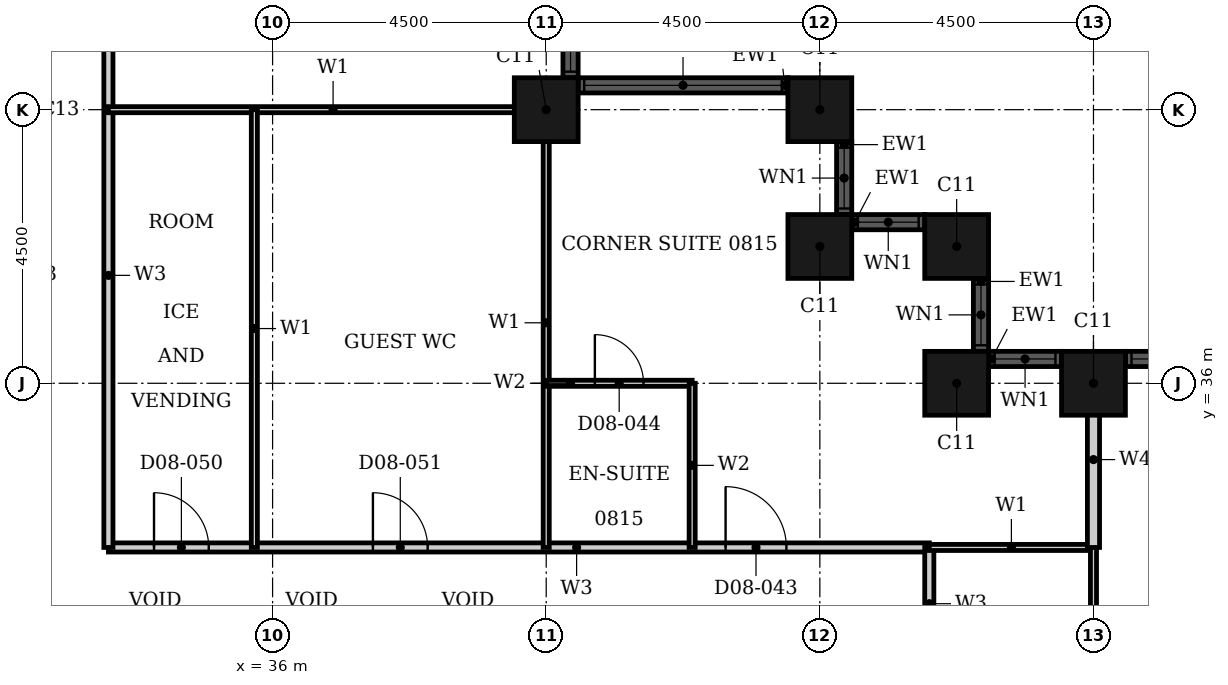
"""IFC4 building model, lengths in metres.
Left out: names, types, materials, properties, quantities, classifications, styles, units other than length and angle.
Written with IfcOpenShell. Run it as: python <this file> out.ifc"""

import sys

from ifc_helpers import new_model, si_unit, direction, frame, frame_2d, origin, origin_2d, place, context, subcontext, project, spatial, rectangle, hollow_rectangle, extrude, element, fill, save


model = new_model("IFC4")
c1 = context("Model", 3, precision=1e-05, world=origin(), true_north=direction((0.0, 1.0)))
c2 = subcontext(c1, "Body", "Model", "MODEL_VIEW")
j1 = project(units=[si_unit("LENGTHUNIT", "METRE"), si_unit("PLANEANGLEUNIT", "RADIAN")], contexts=[c1])
p1 = place(None, origin())
s1 = spatial("IfcSite", under=j1, at=p1, CompositionType="ELEMENT")
p2 = place(p1, origin())
s2 = spatial("IfcBuilding", under=s1, at=p2, CompositionType="ELEMENT")
p3 = place(p2, frame((0.0, 0.0, 40.8)))
s3 = spatial("IfcBuildingStorey", under=s2, at=p3, CompositionType="ELEMENT", Elevation=40.8)
for number, where, z_axis, x_axis in (
    (1, (49.5, 36.0, 0.0), (0.0, 0.0, 1.0), (1.0, 0.0, 0.0)),
    (2, (47.25, 36.0, 0.0), (0.0, 0.0, 1.0), (1.0, 0.0, 0.0)),
    (3, (47.25, 38.25, 0.0), (0.0, 0.0, 1.0), (1.0, 0.0, 0.0)),
    (4, (45.0, 38.25, 0.0), (0.0, 0.0, 1.0), (1.0, 0.0, 0.0)),
    (5, (45.0, 40.5, 0.0), (0.0, 0.0, 1.0), (1.0, 0.0, 0.0)),
    (6, (40.5, 40.5, 0.0), (0.0, 0.0, 1.0), (1.0, 0.0, 0.0)),
):
    element("IfcColumn", number, at=place(p3, frame(where, z_axis=z_axis, x_axis=x_axis)), inside=s3, PredefinedType="COLUMN", context=c2, shape_type="SweptSolid", body=[
        extrude(hollow_rectangle(XDim=1.05, YDim=1.05, WallThickness=0.034, at=origin_2d()), origin(), (0.0, 0.0, 1.0), 3.6),
    ])
p4 = place(p3, frame((57.975, 36.4, 0.0), z_axis=(0.0, 0.0, 1.0), x_axis=(-1.0, 0.0, 0.0)))
e7 = element("IfcWall", 7, at=p4, inside=s3, PredefinedType="SOLIDWALL", context=c2, shape_type="SweptSolid", body=[
    extrude(rectangle(XDim=7.95, YDim=0.25, at=frame_2d((3.975, 0.0))), origin(), (0.0, 0.0, 1.0), 3.6),
])
p5 = place(p4, frame((0.1, 0.0, 0.9)))
e8 = element("IfcOpeningElement", 8, at=p5, cuts=e7, PredefinedType="OPENING", context=c2, shape_type="SweptSolid", body=[
    extrude(rectangle(XDim=3.25, YDim=2.08, at=frame_2d((1.625, 1.04))), frame((0.0, 0.135, 0.0), z_axis=(0.0, -1.0, 0.0), x_axis=(1.0, 0.0, 0.0)), (0.0, 0.0, 1.0), 0.27),
])
p6 = place(p4, frame((4.6, 0.0, 0.9)))
e9 = element("IfcOpeningElement", 9, at=p6, cuts=e7, PredefinedType="OPENING", context=c2, shape_type="SweptSolid", body=[
    extrude(rectangle(XDim=3.25, YDim=2.08, at=frame_2d((1.625, 1.04))), frame((0.0, 0.135, 0.0), z_axis=(0.0, -1.0, 0.0), x_axis=(1.0, 0.0, 0.0)), (0.0, 0.0, 1.0), 0.27),
])
p7 = place(p3, frame((48.975, 36.4, 0.0), z_axis=(0.0, 0.0, 1.0), x_axis=(-1.0, 0.0, 0.0)))
e10 = element("IfcWall", 10, at=p7, inside=s3, PredefinedType="SOLIDWALL", context=c2, shape_type="SweptSolid", body=[
    extrude(rectangle(XDim=1.2, YDim=0.25, at=frame_2d((0.6, 0.0))), origin(), (0.0, 0.0, 1.0), 3.6),
])
p8 = place(p7, frame((0.1, 0.0, 0.9)))
e11 = element("IfcOpeningElement", 11, at=p8, cuts=e10, PredefinedType="OPENING", context=c2, shape_type="SweptSolid", body=[
    extrude(rectangle(XDim=1.0, YDim=2.08, at=frame_2d((0.5, 1.04))), frame((0.0, 0.135, 0.0), z_axis=(0.0, -1.0, 0.0), x_axis=(1.0, 0.0, 0.0)), (0.0, 0.0, 1.0), 0.27),
])
p9 = place(p3, frame((47.65, 36.525, 0.0), z_axis=(0.0, 0.0, 1.0), x_axis=(0.0, 1.0, 0.0)))
e12 = element("IfcWall", 12, at=p9, inside=s3, PredefinedType="SOLIDWALL", context=c2, shape_type="SweptSolid", body=[
    extrude(rectangle(XDim=1.2, YDim=0.25, at=frame_2d((0.6, 0.0))), origin(), (0.0, 0.0, 1.0), 3.6),
])
p10 = place(p9, frame((0.1, 0.0, 0.9)))
e13 = element("IfcOpeningElement", 13, at=p10, cuts=e12, PredefinedType="OPENING", context=c2, shape_type="SweptSolid", body=[
    extrude(rectangle(XDim=1.0, YDim=2.08, at=frame_2d((0.5, 1.04))), frame((0.0, 0.135, 0.0), z_axis=(0.0, -1.0, 0.0), x_axis=(1.0, 0.0, 0.0)), (0.0, 0.0, 1.0), 0.27),
])
p11 = place(p3, frame((46.725, 38.65, 0.0), z_axis=(0.0, 0.0, 1.0), x_axis=(-1.0, 0.0, 0.0)))
e14 = element("IfcWall", 14, at=p11, inside=s3, PredefinedType="SOLIDWALL", context=c2, shape_type="SweptSolid", body=[
    extrude(rectangle(XDim=1.2, YDim=0.25, at=frame_2d((0.6, 0.0))), origin(), (0.0, 0.0, 1.0), 3.6),
])
p12 = place(p11, frame((0.1, 0.0, 0.9)))
e15 = element("IfcOpeningElement", 15, at=p12, cuts=e14, PredefinedType="OPENING", context=c2, shape_type="SweptSolid", body=[
    extrude(rectangle(XDim=1.0, YDim=2.08, at=frame_2d((0.5, 1.04))), frame((0.0, 0.135, 0.0), z_axis=(0.0, -1.0, 0.0), x_axis=(1.0, 0.0, 0.0)), (0.0, 0.0, 1.0), 0.27),
])
p13 = place(p3, frame((45.4, 38.775, 0.0), z_axis=(0.0, 0.0, 1.0), x_axis=(0.0, 1.0, 0.0)))
e16 = element("IfcWall", 16, at=p13, inside=s3, PredefinedType="SOLIDWALL", context=c2, shape_type="SweptSolid", body=[
    extrude(rectangle(XDim=1.2, YDim=0.25, at=frame_2d((0.6, 0.0))), origin(), (0.0, 0.0, 1.0), 3.6),
])
p14 = place(p13, frame((0.1, 0.0, 0.9)))
e17 = element("IfcOpeningElement", 17, at=p14, cuts=e16, PredefinedType="OPENING", context=c2, shape_type="SweptSolid", body=[
    extrude(rectangle(XDim=1.0, YDim=2.08, at=frame_2d((0.5, 1.04))), frame((0.0, 0.135, 0.0), z_axis=(0.0, -1.0, 0.0), x_axis=(1.0, 0.0, 0.0)), (0.0, 0.0, 1.0), 0.27),
])
p15 = place(p3, frame((44.475, 40.9, 0.0), z_axis=(0.0, 0.0, 1.0), x_axis=(-1.0, 0.0, 0.0)))
e18 = element("IfcWall", 18, at=p15, inside=s3, PredefinedType="SOLIDWALL", context=c2, shape_type="SweptSolid", body=[
    extrude(rectangle(XDim=3.45, YDim=0.25, at=frame_2d((1.725, 0.0))), origin(), (0.0, 0.0, 1.0), 3.6),
])
p16 = place(p15, frame((0.1, 0.0, 0.9)))
e19 = element("IfcOpeningElement", 19, at=p16, cuts=e18, PredefinedType="OPENING", context=c2, shape_type="SweptSolid", body=[
    extrude(rectangle(XDim=3.25, YDim=2.08, at=frame_2d((1.625, 1.04))), frame((0.0, 0.135, 0.0), z_axis=(0.0, -1.0, 0.0), x_axis=(1.0, 0.0, 0.0)), (0.0, 0.0, 1.0), 0.27),
])
p17 = place(p3, frame((40.9, 41.025, 0.0), z_axis=(0.0, 0.0, 1.0), x_axis=(0.0, 1.0, 0.0)))
e20 = element("IfcWall", 20, at=p17, inside=s3, PredefinedType="SOLIDWALL", context=c2, shape_type="SweptSolid", body=[
    extrude(rectangle(XDim=7.95, YDim=0.25, at=frame_2d((3.975, 0.0))), origin(), (0.0, 0.0, 1.0), 3.6),
])
p18 = place(p17, frame((0.1, 0.0, 0.9)))
e21 = element("IfcOpeningElement", 21, at=p18, cuts=e20, PredefinedType="OPENING", context=c2, shape_type="SweptSolid", body=[
    extrude(rectangle(XDim=3.25, YDim=2.08, at=frame_2d((1.625, 1.04))), frame((0.0, 0.135, 0.0), z_axis=(0.0, -1.0, 0.0), x_axis=(1.0, 0.0, 0.0)), (0.0, 0.0, 1.0), 0.27),
])
p19 = place(p17, frame((4.6, 0.0, 0.9)))
e22 = element("IfcOpeningElement", 22, at=p19, cuts=e20, PredefinedType="OPENING", context=c2, shape_type="SweptSolid", body=[
    extrude(rectangle(XDim=3.25, YDim=2.08, at=frame_2d((1.625, 1.04))), frame((0.0, 0.135, 0.0), z_axis=(0.0, -1.0, 0.0), x_axis=(1.0, 0.0, 0.0)), (0.0, 0.0, 1.0), 0.27),
])
p20 = place(p3, frame((33.3, 33.3, 0.0), z_axis=(0.0, 0.0, 1.0), x_axis=(1.0, 0.0, 0.0)))
e23 = element("IfcWall", 23, at=p20, inside=s3, PredefinedType="PARTITIONING", context=c2, shape_type="SweptSolid", body=[
    extrude(rectangle(XDim=13.5, YDim=0.15, at=frame_2d((6.75, 0.0))), origin(), (0.0, 0.0, 1.0), 3.3),
])
p21 = place(p20, frame((10.15, 0.0, 0.0)))
e24 = element("IfcOpeningElement", 24, at=p21, cuts=e23, PredefinedType="OPENING", context=c2, shape_type="SweptSolid", body=[
    extrude(rectangle(XDim=1.0, YDim=2.1, at=frame_2d((0.5, 1.05))), frame((0.0, 0.085, 0.0), z_axis=(0.0, -1.0, 0.0), x_axis=(1.0, 0.0, 0.0)), (0.0, 0.0, 1.0), 0.17),
])
p22 = place(p20, frame((0.75, 0.0, 0.0)))
e25 = element("IfcOpeningElement", 25, at=p22, cuts=e23, PredefinedType="OPENING", context=c2, shape_type="SweptSolid", body=[
    extrude(rectangle(XDim=0.9, YDim=2.1, at=frame_2d((0.45, 1.05))), frame((0.0, 0.085, 0.0), z_axis=(0.0, -1.0, 0.0), x_axis=(1.0, 0.0, 0.0)), (0.0, 0.0, 1.0), 0.17),
])
p23 = place(p20, frame((4.35, 0.0, 0.0)))
e26 = element("IfcOpeningElement", 26, at=p23, cuts=e23, PredefinedType="OPENING", context=c2, shape_type="SweptSolid", body=[
    extrude(rectangle(XDim=0.9, YDim=2.1, at=frame_2d((0.45, 1.05))), frame((0.0, 0.085, 0.0), z_axis=(0.0, -1.0, 0.0), x_axis=(1.0, 0.0, 0.0)), (0.0, 0.0, 1.0), 0.17),
])
p24 = place(p3, frame((33.3, 33.3, 0.0), z_axis=(0.0, 0.0, 1.0), x_axis=(0.0, 1.0, 0.0)))
e27 = element("IfcWall", 27, at=p24, inside=s3, PredefinedType="PARTITIONING", context=c2, shape_type="SweptSolid", body=[
    extrude(rectangle(XDim=16.2, YDim=0.15, at=frame_2d((8.1, 0.0))), origin(), (0.0, 0.0, 1.0), 3.3),
])
p25 = place(p24, frame((8.95, 0.0, 0.0)))
e28 = element("IfcOpeningElement", 28, at=p25, cuts=e27, PredefinedType="OPENING", context=c2, shape_type="SweptSolid", body=[
    extrude(rectangle(XDim=1.0, YDim=2.1, at=frame_2d((0.5, 1.05))), frame((0.0, 0.085, 0.0), z_axis=(0.0, -1.0, 0.0), x_axis=(1.0, 0.0, 0.0)), (0.0, 0.0, 1.0), 0.17),
])
p26 = place(p3, frame((46.8, 28.8, 0.0), z_axis=(0.0, 0.0, 1.0), x_axis=(0.0, 1.0, 0.0)))
e29 = element("IfcWall", 29, at=p26, inside=s3, PredefinedType="PARTITIONING", context=c2, shape_type="SweptSolid", body=[
    extrude(rectangle(XDim=4.5, YDim=0.15, at=frame_2d((2.25, 0.0))), origin(), (0.0, 0.0, 1.0), 3.3),
])
p27 = place(p26, frame((1.75, 0.0, 0.0)))
e30 = element("IfcOpeningElement", 30, at=p27, cuts=e29, PredefinedType="OPENING", context=c2, shape_type="SweptSolid", body=[
    extrude(rectangle(XDim=0.9, YDim=2.1, at=frame_2d((0.45, 1.05))), frame((0.0, 0.085, 0.0), z_axis=(0.0, -1.0, 0.0), x_axis=(1.0, 0.0, 0.0)), (0.0, 0.0, 1.0), 0.17),
])
p28 = place(p3, frame((46.8, 33.3, 0.0), z_axis=(0.0, 0.0, 1.0), x_axis=(1.0, 0.0, 0.0)))
e31 = element("IfcWall", 31, at=p28, inside=s3, PredefinedType="PARTITIONING", context=c2, shape_type="SweptSolid", body=[
    extrude(rectangle(XDim=2.7, YDim=0.1, at=frame_2d((1.35, 0.0))), origin(), (0.0, 0.0, 1.0), 3.3),
])
p29 = place(p3, frame((33.3, 40.5, 0.0), z_axis=(0.0, 0.0, 1.0), x_axis=(1.0, 0.0, 0.0)))
e32 = element("IfcWall", 32, at=p29, inside=s3, PredefinedType="PARTITIONING", context=c2, shape_type="SweptSolid", body=[
    extrude(rectangle(XDim=7.39, YDim=0.1, at=frame_2d((3.695, 0.0))), origin(), (0.0, 0.0, 1.0), 2.38),
])
p30 = place(p3, frame((35.7, 33.3, 0.0), z_axis=(0.0, 0.0, 1.0), x_axis=(0.0, 1.0, 0.0)))
e33 = element("IfcWall", 33, at=p30, inside=s3, PredefinedType="PARTITIONING", context=c2, shape_type="SweptSolid", body=[
    extrude(rectangle(XDim=7.2, YDim=0.1, at=frame_2d((3.6, 0.0))), origin(), (0.0, 0.0, 1.0), 3.3),
])
p31 = place(p3, frame((40.5, 33.3, 0.0), z_axis=(0.0, 0.0, 1.0), x_axis=(0.0, 1.0, 0.0)))
e34 = element("IfcWall", 34, at=p31, inside=s3, PredefinedType="PARTITIONING", context=c2, shape_type="SweptSolid", body=[
    extrude(rectangle(XDim=7.39, YDim=0.1, at=frame_2d((3.695, 0.0))), origin(), (0.0, 0.0, 1.0), 3.3),
])
p32 = place(p3, frame((49.5, 28.8, 0.0), z_axis=(0.0, 0.0, 1.0), x_axis=(0.0, 1.0, 0.0)))
e35 = element("IfcWall", 35, at=p32, inside=s3, PredefinedType="PARTITIONING", context=c2, shape_type="SweptSolid", body=[
    extrude(rectangle(XDim=4.5, YDim=0.1, at=frame_2d((2.25, 0.0))), origin(), (0.0, 0.0, 1.0), 2.38),
])
p33 = place(p3, frame((49.5, 33.3, 0.0), z_axis=(0.0, 0.0, 1.0), x_axis=(0.0, 1.0, 0.0)))
e36 = element("IfcWall", 36, at=p33, inside=s3, PredefinedType="PARTITIONING", context=c2, shape_type="SweptSolid", body=[
    extrude(rectangle(XDim=2.89, YDim=0.2, at=frame_2d((1.445, 0.0))), origin(), (0.0, 0.0, 1.0), 2.38),
])
p34 = place(p3, frame((40.5, 36.0, 0.0), z_axis=(0.0, 0.0, 1.0), x_axis=(1.0, 0.0, 0.0)))
e37 = element("IfcWall", 37, at=p34, inside=s3, PredefinedType="PARTITIONING", context=c2, shape_type="SweptSolid", body=[
    extrude(rectangle(XDim=2.4, YDim=0.1, at=frame_2d((1.2, 0.0))), origin(), (0.0, 0.0, 1.0), 3.3),
])
p35 = place(p34, frame((0.8, 0.0, 0.0)))
e38 = element("IfcOpeningElement", 38, at=p35, cuts=e37, PredefinedType="OPENING", context=c2, shape_type="SweptSolid", body=[
    extrude(rectangle(XDim=0.8, YDim=2.1, at=frame_2d((0.4, 1.05))), frame((0.0, 0.06, 0.0), z_axis=(0.0, -1.0, 0.0), x_axis=(1.0, 0.0, 0.0)), (0.0, 0.0, 1.0), 0.12),
])
p36 = place(p3, frame((42.9, 33.3, 0.0), z_axis=(0.0, 0.0, 1.0), x_axis=(0.0, 1.0, 0.0)))
e39 = element("IfcWall", 39, at=p36, inside=s3, PredefinedType="PARTITIONING", context=c2, shape_type="SweptSolid", body=[
    extrude(rectangle(XDim=2.7, YDim=0.1, at=frame_2d((1.35, 0.0))), origin(), (0.0, 0.0, 1.0), 3.3),
])
p37 = place(p6, origin())
e40 = element("IfcWindow", 40, at=p37, inside=s3, PartitioningType="SINGLE_PANEL", PredefinedType="WINDOW", context=c2, shape_type="SweptSolid", body=[
    extrude(rectangle(XDim=3.25, YDim=2.08, at=frame_2d((1.625, 1.04))), frame((0.0, 0.03, 0.0), z_axis=(0.0, -1.0, 0.0), x_axis=(1.0, 0.0, 0.0)), (0.0, 0.0, 1.0), 0.06),
])
fill(e9, e40)
p38 = place(p8, origin())
e41 = element("IfcWindow", 41, at=p38, inside=s3, PartitioningType="SINGLE_PANEL", PredefinedType="WINDOW", context=c2, shape_type="SweptSolid", body=[
    extrude(rectangle(XDim=1.0, YDim=2.08, at=frame_2d((0.5, 1.04))), frame((0.0, 0.03, 0.0), z_axis=(0.0, -1.0, 0.0), x_axis=(1.0, 0.0, 0.0)), (0.0, 0.0, 1.0), 0.06),
])
fill(e11, e41)
p39 = place(p10, origin())
e42 = element("IfcWindow", 42, at=p39, inside=s3, PartitioningType="SINGLE_PANEL", PredefinedType="WINDOW", context=c2, shape_type="SweptSolid", body=[
    extrude(rectangle(XDim=1.0, YDim=2.08, at=frame_2d((0.5, 1.04))), frame((0.0, 0.03, 0.0), z_axis=(0.0, -1.0, 0.0), x_axis=(1.0, 0.0, 0.0)), (0.0, 0.0, 1.0), 0.06),
])
fill(e13, e42)
p40 = place(p12, origin())
e43 = element("IfcWindow", 43, at=p40, inside=s3, PartitioningType="SINGLE_PANEL", PredefinedType="WINDOW", context=c2, shape_type="SweptSolid", body=[
    extrude(rectangle(XDim=1.0, YDim=2.08, at=frame_2d((0.5, 1.04))), frame((0.0, 0.03, 0.0), z_axis=(0.0, -1.0, 0.0), x_axis=(1.0, 0.0, 0.0)), (0.0, 0.0, 1.0), 0.06),
])
fill(e15, e43)
p41 = place(p14, origin())
e44 = element("IfcWindow", 44, at=p41, inside=s3, PartitioningType="SINGLE_PANEL", PredefinedType="WINDOW", context=c2, shape_type="SweptSolid", body=[
    extrude(rectangle(XDim=1.0, YDim=2.08, at=frame_2d((0.5, 1.04))), frame((0.0, 0.03, 0.0), z_axis=(0.0, -1.0, 0.0), x_axis=(1.0, 0.0, 0.0)), (0.0, 0.0, 1.0), 0.06),
])
fill(e17, e44)
p42 = place(p16, origin())
e45 = element("IfcWindow", 45, at=p42, inside=s3, PartitioningType="SINGLE_PANEL", PredefinedType="WINDOW", context=c2, shape_type="SweptSolid", body=[
    extrude(rectangle(XDim=3.25, YDim=2.08, at=frame_2d((1.625, 1.04))), frame((0.0, 0.03, 0.0), z_axis=(0.0, -1.0, 0.0), x_axis=(1.0, 0.0, 0.0)), (0.0, 0.0, 1.0), 0.06),
])
fill(e19, e45)
p43 = place(p18, origin())
e46 = element("IfcWindow", 46, at=p43, inside=s3, PartitioningType="SINGLE_PANEL", PredefinedType="WINDOW", context=c2, shape_type="SweptSolid", body=[
    extrude(rectangle(XDim=3.25, YDim=2.08, at=frame_2d((1.625, 1.04))), frame((0.0, 0.03, 0.0), z_axis=(0.0, -1.0, 0.0), x_axis=(1.0, 0.0, 0.0)), (0.0, 0.0, 1.0), 0.06),
])
fill(e21, e46)
p44 = place(p21, origin())
e47 = element("IfcDoor", 47, at=p44, inside=s3, OperationType="SINGLE_SWING_RIGHT", PredefinedType="DOOR", context=c2, shape_type="SweptSolid", body=[
    extrude(rectangle(XDim=1.0, YDim=2.1, at=frame_2d((0.5, 1.05))), frame((0.0, 0.025, 0.0), z_axis=(0.0, -1.0, 0.0), x_axis=(1.0, 0.0, 0.0)), (0.0, 0.0, 1.0), 0.05),
])
fill(e24, e47)
p45 = place(p35, origin())
e48 = element("IfcDoor", 48, at=p45, inside=s3, OperationType="SINGLE_SWING_RIGHT", PredefinedType="DOOR", context=c2, shape_type="SweptSolid", body=[
    extrude(rectangle(XDim=0.8, YDim=2.1, at=frame_2d((0.4, 1.05))), frame((0.0, 0.025, 0.0), z_axis=(0.0, -1.0, 0.0), x_axis=(1.0, 0.0, 0.0)), (0.0, 0.0, 1.0), 0.05),
])
fill(e38, e48)
p46 = place(p22, origin())
e49 = element("IfcDoor", 49, at=p46, inside=s3, OperationType="SINGLE_SWING_LEFT", PredefinedType="DOOR", context=c2, shape_type="SweptSolid", body=[
    extrude(rectangle(XDim=0.9, YDim=2.1, at=frame_2d((0.45, 1.05))), frame((0.0, 0.025, 0.0), z_axis=(0.0, -1.0, 0.0), x_axis=(1.0, 0.0, 0.0)), (0.0, 0.0, 1.0), 0.05),
])
fill(e25, e49)
p47 = place(p23, origin())
e50 = element("IfcDoor", 50, at=p47, inside=s3, OperationType="SINGLE_SWING_RIGHT", PredefinedType="DOOR", context=c2, shape_type="SweptSolid", body=[
    extrude(rectangle(XDim=0.9, YDim=2.1, at=frame_2d((0.45, 1.05))), frame((0.0, 0.025, 0.0), z_axis=(0.0, -1.0, 0.0), x_axis=(1.0, 0.0, 0.0)), (0.0, 0.0, 1.0), 0.05),
])
fill(e26, e50)
save(model, sys.argv[1])
